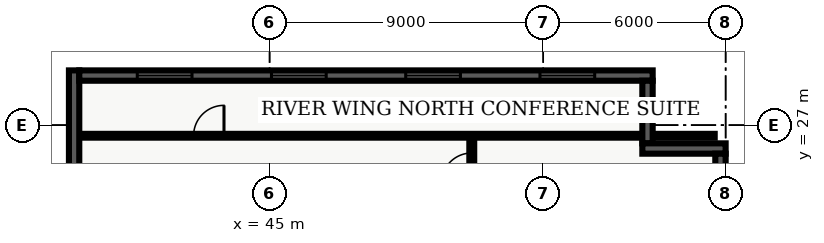
"""IFC4 building model, lengths in metres.
Left out: names, types, materials, properties, quantities, classifications, styles, units other than length and angle.
Written with IfcOpenShell. Run it as: python <this file> out.ifc"""

import sys

from ifc_helpers import new_model, entity, si_unit, converted_unit, direction, frame, origin_with_axes, origin_2d_with_axis, place, context, subcontext, project, spatial, polyline, rectangle, outline, extrude, element, fill, save


model = new_model("IFC4")
c1 = context("Model", 3, precision=1e-05, world=origin_with_axes(), true_north=direction((0.0, 1.0)))
c2 = subcontext(c1, "Body", "Model", "MODEL_VIEW")
j1 = project(units=[si_unit("LENGTHUNIT", "METRE"), converted_unit("PLANEANGLEUNIT", "DEGREE", entity("IfcPlaneAngleMeasure", 0.017), si_unit("PLANEANGLEUNIT", "RADIAN"), dimensions=[0, 0, 0, 0, 0, 0, 0])], contexts=[c1])
p1 = place(None, origin_with_axes())
s1 = spatial("IfcSite", under=j1, at=p1, CompositionType="ELEMENT")
p2 = place(p1, origin_with_axes())
s2 = spatial("IfcBuilding", under=s1, at=p2, CompositionType="ELEMENT")
p3 = place(p2, frame((0.0, 0.0, 148.5), z_axis=(0.0, 0.0, 1.0), x_axis=(1.0, 0.0, 0.0)))
s3 = spatial("IfcBuildingStorey", under=s2, at=p3, CompositionType="ELEMENT", Elevation=148.5)
p4 = place(p3, frame((51.65, 7.85, 0.0), z_axis=(0.0, 0.0, 1.0), x_axis=(0.0, 1.0, 0.0)))
e1 = element("IfcWall", 1, at=p4, inside=s3, PredefinedType="PARTITIONING", context=c2, shape_type="SweptSolid", body=[
    extrude(outline(polyline([(0.0, -0.08), (18.8, -0.08), (18.8, 0.08), (0.0, 0.08), (0.0, -0.08)])), origin_with_axes(), (0.0, 0.0, 1.0), 2.7),
])
p5 = place(p4, frame((4.559, 0.0, 0.0), z_axis=(0.0, 0.0, 1.0), x_axis=(1.0, 0.0, 0.0)))
e2 = element("IfcOpeningElement", 2, at=p5, cuts=e1, PredefinedType="OPENING", context=c2, shape_type="SweptSolid", body=[
    extrude(rectangle(XDim=1.0, YDim=0.18, at=origin_2d_with_axis()), origin_with_axes(), (0.0, 0.0, 1.0), 2.15),
])
p6 = place(p4, frame((11.523, 0.0, 0.0), z_axis=(0.0, 0.0, 1.0), x_axis=(1.0, 0.0, 0.0)))
e3 = element("IfcOpeningElement", 3, at=p6, cuts=e1, PredefinedType="OPENING", context=c2, shape_type="SweptSolid", body=[
    extrude(rectangle(XDim=1.0, YDim=0.18, at=origin_2d_with_axis()), origin_with_axes(), (0.0, 0.0, 1.0), 2.15),
])
p7 = place(p4, frame((17.733, 0.0, 0.0), z_axis=(0.0, 0.0, 1.0), x_axis=(1.0, 0.0, 0.0)))
e4 = element("IfcOpeningElement", 4, at=p7, cuts=e1, PredefinedType="OPENING", context=c2, shape_type="SweptSolid", body=[
    extrude(rectangle(XDim=1.0, YDim=0.18, at=origin_2d_with_axis()), origin_with_axes(), (0.0, 0.0, 1.0), 2.15),
])
p8 = place(p3, frame((38.735, 26.65, 0.0), z_axis=(0.0, 0.0, 1.0), x_axis=(1.0, 0.0, 0.0)))
e5 = element("IfcWall", 5, at=p8, inside=s3, PredefinedType="PARTITIONING", context=c2, shape_type="SweptSolid", body=[
    extrude(outline(polyline([(0.0, -0.062), (20.905, -0.062), (20.905, 0.062), (0.0, 0.062), (0.0, -0.062)])), origin_with_axes(), (0.0, 0.0, 1.0), 2.7),
])
p9 = place(p8, frame((4.265, 0.0, 0.0), z_axis=(0.0, 0.0, 1.0), x_axis=(1.0, 0.0, 0.0)))
e6 = element("IfcOpeningElement", 6, at=p9, cuts=e5, PredefinedType="OPENING", context=c2, shape_type="SweptSolid", body=[
    extrude(rectangle(XDim=1.0, YDim=0.145, at=origin_2d_with_axis()), origin_with_axes(), (0.0, 0.0, 1.0), 2.15),
])
p10 = place(p3, frame((38.57, 21.26, 0.0), z_axis=(0.0, 0.0, 1.0), x_axis=(0.0, 1.0, 0.0)))
e7 = element("IfcWall", 7, at=p10, inside=s3, PredefinedType="SOLIDWALL", context=c2, shape_type="SweptSolid", body=[
    extrude(outline(polyline([(0.0, -0.17), (7.54, -0.17), (7.54, 0.17), (0.0, 0.17), (0.0, -0.17)])), origin_with_axes(), (0.0, 0.0, 1.0), 3.66),
])
p11 = place(p3, frame((38.74, 28.63, 0.0), z_axis=(0.0, 0.0, 1.0), x_axis=(1.0, 0.0, 0.0)))
e8 = element("IfcWall", 8, at=p11, inside=s3, PredefinedType="SOLIDWALL", context=c2, shape_type="SweptSolid", body=[
    extrude(outline(polyline([(0.0, -0.17), (18.86, -0.17), (18.86, 0.17), (0.0, 0.17), (0.0, -0.17)])), origin_with_axes(), (0.0, 0.0, 1.0), 3.66),
])
p12 = place(p11, frame((2.808, 0.0, 0.45), z_axis=(0.0, 0.0, 1.0), x_axis=(1.0, 0.0, 0.0)))
e9 = element("IfcOpeningElement", 9, at=p12, cuts=e8, PredefinedType="OPENING", context=c2, shape_type="SweptSolid", body=[
    extrude(rectangle(XDim=1.8, YDim=0.36, at=origin_2d_with_axis()), origin_with_axes(), (0.0, 0.0, 1.0), 2.1),
])
p13 = place(p11, frame((7.222, 0.0, 0.45), z_axis=(0.0, 0.0, 1.0), x_axis=(1.0, 0.0, 0.0)))
e10 = element("IfcOpeningElement", 10, at=p13, cuts=e8, PredefinedType="OPENING", context=c2, shape_type="SweptSolid", body=[
    extrude(rectangle(XDim=1.8, YDim=0.36, at=origin_2d_with_axis()), origin_with_axes(), (0.0, 0.0, 1.0), 2.1),
])
p14 = place(p11, frame((11.637, 0.0, 0.45), z_axis=(0.0, 0.0, 1.0), x_axis=(1.0, 0.0, 0.0)))
e11 = element("IfcOpeningElement", 11, at=p14, cuts=e8, PredefinedType="OPENING", context=c2, shape_type="SweptSolid", body=[
    extrude(rectangle(XDim=1.8, YDim=0.36, at=origin_2d_with_axis()), origin_with_axes(), (0.0, 0.0, 1.0), 2.1),
])
p15 = place(p11, frame((16.053, 0.0, 0.45), z_axis=(0.0, 0.0, 1.0), x_axis=(1.0, 0.0, 0.0)))
e12 = element("IfcOpeningElement", 12, at=p15, cuts=e8, PredefinedType="OPENING", context=c2, shape_type="SweptSolid", body=[
    extrude(rectangle(XDim=1.8, YDim=0.36, at=origin_2d_with_axis()), origin_with_axes(), (0.0, 0.0, 1.0), 2.1),
])
p16 = place(p3, frame((57.43, 28.46, 0.0), z_axis=(0.0, 0.0, 1.0), x_axis=(0.0, -1.0, 0.0)))
e13 = element("IfcWall", 13, at=p16, inside=s3, PredefinedType="SOLIDWALL", context=c2, shape_type="SweptSolid", body=[
    extrude(outline(polyline([(0.0, -0.17), (2.06, -0.17), (2.06, 0.17), (0.0, 0.17), (0.0, -0.17)])), origin_with_axes(), (0.0, 0.0, 1.0), 3.66),
])
p17 = place(p3, frame((57.26, 26.23, 0.0), z_axis=(0.0, 0.0, 1.0), x_axis=(1.0, 0.0, 0.0)))
e14 = element("IfcWall", 14, at=p17, inside=s3, PredefinedType="SOLIDWALL", context=c2, shape_type="SweptSolid", body=[
    extrude(outline(polyline([(0.0, -0.17), (2.74, -0.17), (2.74, 0.17), (0.0, 0.17), (0.0, -0.17)])), origin_with_axes(), (0.0, 0.0, 1.0), 3.66),
])
p18 = place(p3, frame((59.83, 26.06, 0.0), z_axis=(0.0, 0.0, 1.0), x_axis=(0.0, -1.0, 0.0)))
e15 = element("IfcWall", 15, at=p18, inside=s3, PredefinedType="SOLIDWALL", context=c2, shape_type="SweptSolid", body=[
    extrude(outline(polyline([(0.0, -0.17), (23.66, -0.17), (23.66, 0.17), (0.0, 0.17), (0.0, -0.17)])), origin_with_axes(), (0.0, 0.0, 1.0), 3.66),
])
p19 = place(p18, frame((11.83, 0.0, 0.45), z_axis=(0.0, 0.0, 1.0), x_axis=(1.0, 0.0, 0.0)))
e16 = element("IfcOpeningElement", 16, at=p19, cuts=e15, PredefinedType="OPENING", context=c2, shape_type="SweptSolid", body=[
    extrude(rectangle(XDim=1.8, YDim=0.36, at=origin_2d_with_axis()), origin_with_axes(), (0.0, 0.0, 1.0), 2.1),
])
p20 = place(p18, frame((20.364, 0.0, 0.45), z_axis=(0.0, 0.0, 1.0), x_axis=(1.0, 0.0, 0.0)))
e17 = element("IfcOpeningElement", 17, at=p20, cuts=e15, PredefinedType="OPENING", context=c2, shape_type="SweptSolid", body=[
    extrude(rectangle(XDim=1.8, YDim=0.36, at=origin_2d_with_axis()), origin_with_axes(), (0.0, 0.0, 1.0), 2.1),
])
p21 = place(p8, frame((4.265, 0.0, 0.0), z_axis=(0.0, 0.0, 1.0), x_axis=(1.0, 0.0, 0.0)))
e18 = element("IfcDoor", 18, at=p21, inside=s3, OperationType="SINGLE_SWING_RIGHT", PredefinedType="DOOR", context=c2, shape_type="SweptSolid", body=[
    extrude(rectangle(XDim=1.0, YDim=0.075, at=origin_2d_with_axis()), origin_with_axes(), (0.0, 0.0, 1.0), 2.15),
])
fill(e6, e18)
p22 = place(p4, frame((17.733, 0.0, 0.0), z_axis=(0.0, 0.0, 1.0), x_axis=(1.0, 0.0, 0.0)))
e19 = element("IfcDoor", 19, at=p22, inside=s3, OperationType="SINGLE_SWING_LEFT", PredefinedType="DOOR", context=c2, shape_type="SweptSolid", body=[
    extrude(rectangle(XDim=1.0, YDim=0.09, at=origin_2d_with_axis()), origin_with_axes(), (0.0, 0.0, 1.0), 2.15),
])
fill(e4, e19)
p23 = place(p11, frame((2.808, 0.0, 0.45), z_axis=(0.0, 0.0, 1.0), x_axis=(1.0, 0.0, 0.0)))
e20 = element("IfcWindow", 20, at=p23, inside=s3, PredefinedType="WINDOW", context=c2, shape_type="SweptSolid", body=[
    extrude(rectangle(XDim=1.8, YDim=0.09, at=origin_2d_with_axis()), origin_with_axes(), (0.0, 0.0, 1.0), 2.1),
])
fill(e9, e20)
p24 = place(p11, frame((7.222, 0.0, 0.45), z_axis=(0.0, 0.0, 1.0), x_axis=(1.0, 0.0, 0.0)))
e21 = element("IfcWindow", 21, at=p24, inside=s3, PredefinedType="WINDOW", context=c2, shape_type="SweptSolid", body=[
    extrude(rectangle(XDim=1.8, YDim=0.09, at=origin_2d_with_axis()), origin_with_axes(), (0.0, 0.0, 1.0), 2.1),
])
fill(e10, e21)
p25 = place(p11, frame((11.637, 0.0, 0.45), z_axis=(0.0, 0.0, 1.0), x_axis=(1.0, 0.0, 0.0)))
e22 = element("IfcWindow", 22, at=p25, inside=s3, PredefinedType="WINDOW", context=c2, shape_type="SweptSolid", body=[
    extrude(rectangle(XDim=1.8, YDim=0.09, at=origin_2d_with_axis()), origin_with_axes(), (0.0, 0.0, 1.0), 2.1),
])
fill(e11, e22)
p26 = place(p11, frame((16.053, 0.0, 0.45), z_axis=(0.0, 0.0, 1.0), x_axis=(1.0, 0.0, 0.0)))
e23 = element("IfcWindow", 23, at=p26, inside=s3, PredefinedType="WINDOW", context=c2, shape_type="SweptSolid", body=[
    extrude(rectangle(XDim=1.8, YDim=0.09, at=origin_2d_with_axis()), origin_with_axes(), (0.0, 0.0, 1.0), 2.1),
])
fill(e12, e23)
save(model, sys.argv[1])
